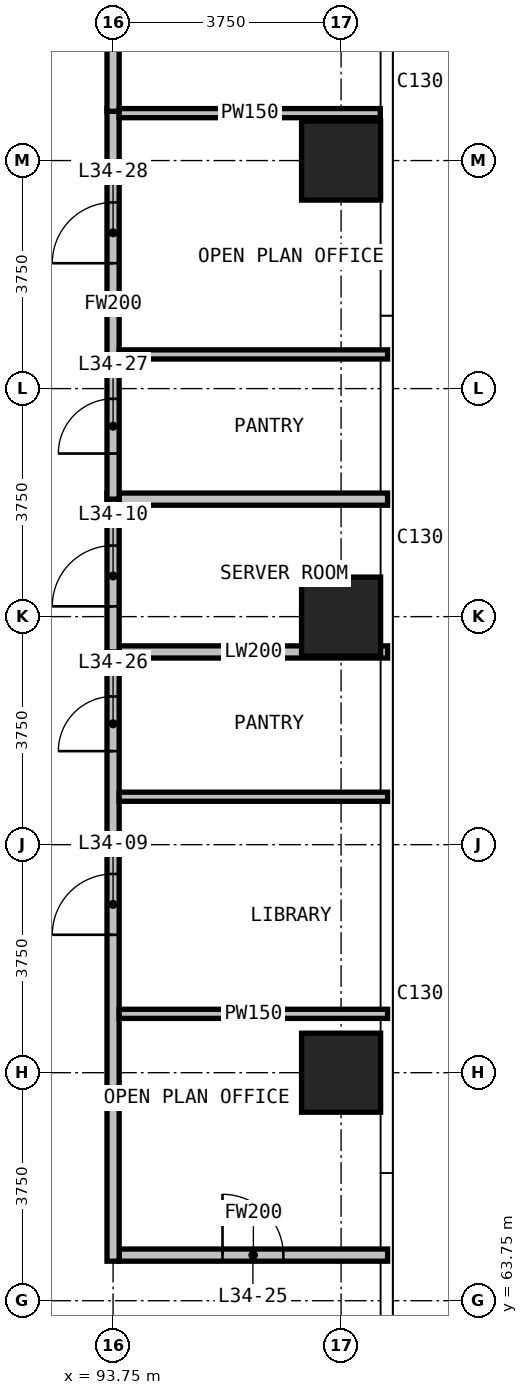
"""IFC4 building model, lengths in metres.
Left out: names, types, materials, properties, quantities, classifications, styles, units other than length and angle.
Written with IfcOpenShell. Run it as: python <this file> out.ifc"""

import sys

from ifc_helpers import new_model, si_unit, direction, frame, frame_2d, origin, origin_2d, place, context, subcontext, project, spatial, rectangle, extrude, element, fill, save


model = new_model("IFC4")
c1 = context("Model", 3, precision=1e-05, world=origin(), true_north=direction((0.0, 1.0)))
c2 = subcontext(c1, "Body", "Model", "MODEL_VIEW")
j1 = project(units=[si_unit("LENGTHUNIT", "METRE"), si_unit("PLANEANGLEUNIT", "RADIAN")], contexts=[c1])
p1 = place(None, origin())
s1 = spatial("IfcSite", under=j1, at=p1, CompositionType="ELEMENT")
p2 = place(p1, origin())
s2 = spatial("IfcBuilding", under=s1, at=p2, CompositionType="ELEMENT")
p3 = place(p2, frame((0.0, 0.0, 136.0)))
s3 = spatial("IfcBuildingStorey", under=s2, at=p3, CompositionType="ELEMENT", Elevation=136.0)
for number, where, z_axis, x_axis in (
    (1, (97.5, 67.5, 0.0), (0.0, 0.0, 1.0), (1.0, 0.0, 0.0)),
    (2, (97.5, 75.0, 0.0), (0.0, 0.0, 1.0), (1.0, 0.0, 0.0)),
    (3, (97.5, 82.5, 0.0), (0.0, 0.0, 1.0), (1.0, 0.0, 0.0)),
):
    element("IfcColumn", number, at=place(p3, frame(where, z_axis=z_axis, x_axis=x_axis)), inside=s3, PredefinedType="COLUMN", context=c2, shape_type="SweptSolid", body=[
        extrude(rectangle(XDim=1.3, YDim=1.3, at=origin_2d()), origin(), (0.0, 0.0, 1.0), 3.6),
    ])
for number, where, z_axis, x_axis in (
    (4, (93.85, 74.419, 0.0), (0.0, 0.0, 1.0), (1.0, 0.0, 0.0)),
    (5, (93.85, 76.932, 0.0), (0.0, 0.0, 1.0), (1.0, 0.0, 0.0)),
):
    element("IfcWall", number, at=place(p3, frame(where, z_axis=z_axis, x_axis=x_axis)), inside=s3, PredefinedType="PARTITIONING", context=c2, shape_type="SweptSolid", body=[
        extrude(rectangle(XDim=4.415, YDim=0.2, at=frame_2d((2.208, 0.0))), origin(), (0.0, 0.0, 1.0), 3.3),
    ])
p4 = place(p3, frame((93.75, 74.319, 0.0), z_axis=(0.0, 0.0, 1.0), x_axis=(0.0, 1.0, 0.0)))
e6 = element("IfcWall", 6, at=p4, inside=s3, PredefinedType="PARTITIONING", context=c2, shape_type="SweptSolid", body=[
    extrude(rectangle(XDim=2.713, YDim=0.2, at=frame_2d((1.356, 0.0))), origin(), (0.0, 0.0, 1.0), 3.3),
])
p5 = place(p4, frame((0.85, 0.0, 0.0)))
e7 = element("IfcOpeningElement", 7, at=p5, cuts=e6, PredefinedType="OPENING", context=c2, shape_type="SweptSolid", body=[
    extrude(rectangle(XDim=1.0, YDim=2.2, at=frame_2d((0.5, 1.1))), frame((0.0, 0.11, 0.0), z_axis=(0.0, -1.0, 0.0), x_axis=(1.0, 0.0, 0.0)), (0.0, 0.0, 1.0), 0.22),
])
p6 = place(p3, frame((93.85, 64.5, 0.0), z_axis=(0.0, 0.0, 1.0), x_axis=(1.0, 0.0, 0.0)))
e8 = element("IfcWall", 8, at=p6, inside=s3, PredefinedType="PARTITIONING", context=c2, shape_type="SweptSolid", body=[
    extrude(rectangle(XDim=4.415, YDim=0.2, at=frame_2d((2.208, 0.0))), origin(), (0.0, 0.0, 1.0), 3.3),
])
p7 = place(p6, frame((1.7, 0.0, 0.0)))
e9 = element("IfcOpeningElement", 9, at=p7, cuts=e8, PredefinedType="OPENING", context=c2, shape_type="SweptSolid", body=[
    extrude(rectangle(XDim=1.0, YDim=2.2, at=frame_2d((0.5, 1.1))), frame((0.0, 0.11, 0.0), z_axis=(0.0, -1.0, 0.0), x_axis=(1.0, 0.0, 0.0)), (0.0, 0.0, 1.0), 0.22),
])
p8 = place(p3, frame((93.75, 64.4, 0.0), z_axis=(0.0, 0.0, 1.0), x_axis=(0.0, 1.0, 0.0)))
e10 = element("IfcWall", 10, at=p8, inside=s3, PredefinedType="PARTITIONING", context=c2, shape_type="SweptSolid", body=[
    extrude(rectangle(XDim=10.019, YDim=0.2, at=frame_2d((5.01, 0.0))), origin(), (0.0, 0.0, 1.0), 3.3),
])
p9 = place(p8, frame((5.368, 0.0, 0.0)))
e11 = element("IfcOpeningElement", 11, at=p9, cuts=e10, PredefinedType="OPENING", context=c2, shape_type="SweptSolid", body=[
    extrude(rectangle(XDim=1.0, YDim=2.2, at=frame_2d((0.5, 1.1))), frame((0.0, 0.11, 0.0), z_axis=(0.0, -1.0, 0.0), x_axis=(1.0, 0.0, 0.0)), (0.0, 0.0, 1.0), 0.22),
])
p10 = place(p8, frame((8.388, 0.0, 0.0)))
e12 = element("IfcOpeningElement", 12, at=p10, cuts=e10, PredefinedType="OPENING", context=c2, shape_type="SweptSolid", body=[
    extrude(rectangle(XDim=0.9, YDim=2.2, at=frame_2d((0.45, 1.1))), frame((0.0, 0.11, 0.0), z_axis=(0.0, -1.0, 0.0), x_axis=(1.0, 0.0, 0.0)), (0.0, 0.0, 1.0), 0.22),
])
p11 = place(p3, frame((93.75, 76.932, 0.0), z_axis=(0.0, 0.0, 1.0), x_axis=(0.0, 1.0, 0.0)))
e13 = element("IfcWall", 13, at=p11, inside=s3, PredefinedType="PARTITIONING", context=c2, shape_type="SweptSolid", body=[
    extrude(rectangle(XDim=6.423, YDim=0.2, at=frame_2d((3.211, 0.0))), origin(), (0.0, 0.0, 1.0), 3.3),
])
p12 = place(p11, frame((0.75, 0.0, 0.0)))
e14 = element("IfcOpeningElement", 14, at=p12, cuts=e13, PredefinedType="OPENING", context=c2, shape_type="SweptSolid", body=[
    extrude(rectangle(XDim=0.9, YDim=2.2, at=frame_2d((0.45, 1.1))), frame((0.0, 0.11, 0.0), z_axis=(0.0, -1.0, 0.0), x_axis=(1.0, 0.0, 0.0)), (0.0, 0.0, 1.0), 0.22),
])
p13 = place(p11, frame((3.88, 0.0, 0.0)))
e15 = element("IfcOpeningElement", 15, at=p13, cuts=e13, PredefinedType="OPENING", context=c2, shape_type="SweptSolid", body=[
    extrude(rectangle(XDim=1.0, YDim=2.2, at=frame_2d((0.5, 1.1))), frame((0.0, 0.11, 0.0), z_axis=(0.0, -1.0, 0.0), x_axis=(1.0, 0.0, 0.0)), (0.0, 0.0, 1.0), 0.22),
])
p14 = place(p3, frame((93.75, 83.31, 0.0), z_axis=(0.0, 0.0, 1.0), x_axis=(0.0, 1.0, 0.0)))
e16 = element("IfcWall", 16, at=p14, inside=s3, PredefinedType="PARTITIONING", context=c2, shape_type="SweptSolid", body=[
    extrude(rectangle(XDim=7.335, YDim=0.2, at=frame_2d((3.667, 0.0))), origin(), (0.0, 0.0, 1.0), 3.3),
])
for number, where, z_axis, x_axis in (
    (17, (93.85, 68.468, 0.0), (0.0, 0.0, 1.0), (1.0, 0.0, 0.0)),
    (18, (93.85, 72.038, 0.0), (0.0, 0.0, 1.0), (1.0, 0.0, 0.0)),
    (19, (93.85, 79.312, 0.0), (0.0, 0.0, 1.0), (1.0, 0.0, 0.0)),
):
    element("IfcWall", number, at=place(p3, frame(where, z_axis=z_axis, x_axis=x_axis)), inside=s3, PredefinedType="PARTITIONING", context=c2, shape_type="SweptSolid", body=[
        extrude(rectangle(XDim=4.415, YDim=0.15, at=frame_2d((2.208, 0.0))), origin(), (0.0, 0.0, 1.0), 3.3),
    ])
p15 = place(p3, frame((93.85, 83.28, 0.0), z_axis=(0.0, 0.0, 1.0), x_axis=(1.0, 0.0, 0.0)))
e20 = element("IfcWall", 20, at=p15, inside=s3, PredefinedType="PARTITIONING", context=c2, shape_type="SweptSolid", body=[
    extrude(rectangle(XDim=4.295, YDim=0.15, at=frame_2d((2.147, 0.0))), origin(), (0.0, 0.0, 1.0), 3.3),
])
p16 = place(p9, origin())
e21 = element("IfcDoor", 21, at=p16, inside=s3, OperationType="SINGLE_SWING_RIGHT", PredefinedType="DOOR", context=c2, shape_type="SweptSolid", body=[
    extrude(rectangle(XDim=1.0, YDim=2.2, at=frame_2d((0.5, 1.1))), frame((0.0, 0.025, 0.0), z_axis=(0.0, -1.0, 0.0), x_axis=(1.0, 0.0, 0.0)), (0.0, 0.0, 1.0), 0.05),
])
fill(e11, e21)
p17 = place(p5, origin())
e22 = element("IfcDoor", 22, at=p17, inside=s3, OperationType="SINGLE_SWING_LEFT", PredefinedType="DOOR", context=c2, shape_type="SweptSolid", body=[
    extrude(rectangle(XDim=1.0, YDim=2.2, at=frame_2d((0.5, 1.1))), frame((0.0, 0.025, 0.0), z_axis=(0.0, -1.0, 0.0), x_axis=(1.0, 0.0, 0.0)), (0.0, 0.0, 1.0), 0.05),
])
fill(e7, e22)
p18 = place(p7, origin())
e23 = element("IfcDoor", 23, at=p18, inside=s3, OperationType="SINGLE_SWING_LEFT", PredefinedType="DOOR", context=c2, shape_type="SweptSolid", body=[
    extrude(rectangle(XDim=1.0, YDim=2.2, at=frame_2d((0.5, 1.1))), frame((0.0, 0.025, 0.0), z_axis=(0.0, -1.0, 0.0), x_axis=(1.0, 0.0, 0.0)), (0.0, 0.0, 1.0), 0.05),
])
fill(e9, e23)
p19 = place(p10, origin())
e24 = element("IfcDoor", 24, at=p19, inside=s3, OperationType="SINGLE_SWING_LEFT", PredefinedType="DOOR", context=c2, shape_type="SweptSolid", body=[
    extrude(rectangle(XDim=0.9, YDim=2.2, at=frame_2d((0.45, 1.1))), frame((0.0, 0.025, 0.0), z_axis=(0.0, -1.0, 0.0), x_axis=(1.0, 0.0, 0.0)), (0.0, 0.0, 1.0), 0.05),
])
fill(e12, e24)
p20 = place(p12, origin())
e25 = element("IfcDoor", 25, at=p20, inside=s3, OperationType="SINGLE_SWING_LEFT", PredefinedType="DOOR", context=c2, shape_type="SweptSolid", body=[
    extrude(rectangle(XDim=0.9, YDim=2.2, at=frame_2d((0.45, 1.1))), frame((0.0, 0.025, 0.0), z_axis=(0.0, -1.0, 0.0), x_axis=(1.0, 0.0, 0.0)), (0.0, 0.0, 1.0), 0.05),
])
fill(e14, e25)
p21 = place(p13, origin())
e26 = element("IfcDoor", 26, at=p21, inside=s3, OperationType="SINGLE_SWING_LEFT", PredefinedType="DOOR", context=c2, shape_type="SweptSolid", body=[
    extrude(rectangle(XDim=1.0, YDim=2.2, at=frame_2d((0.5, 1.1))), frame((0.0, 0.025, 0.0), z_axis=(0.0, -1.0, 0.0), x_axis=(1.0, 0.0, 0.0)), (0.0, 0.0, 1.0), 0.05),
])
fill(e15, e26)
save(model, sys.argv[1])
